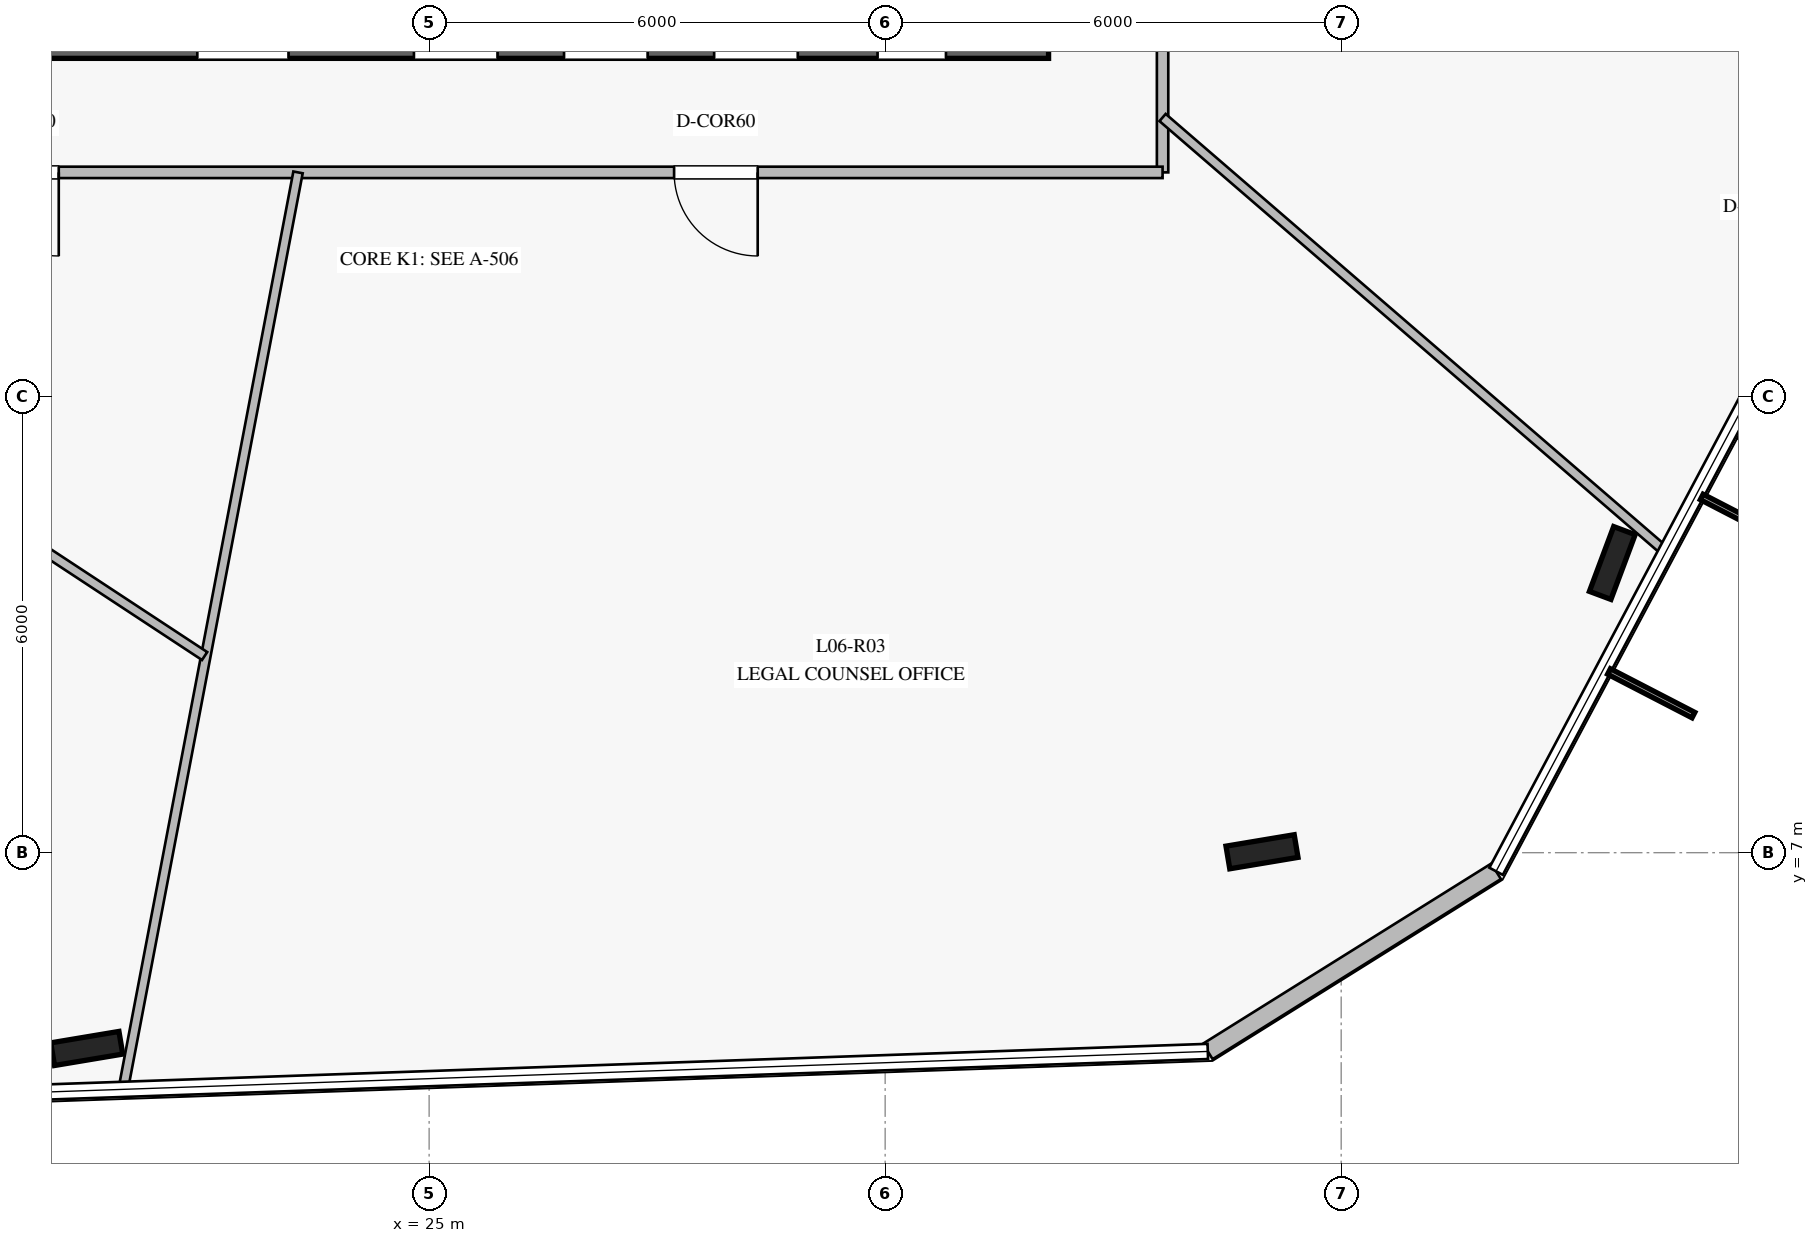
"""IFC4 building model, lengths in metres.
Left out: names, types, materials, properties, quantities, classifications, styles, units other than length and angle.
Written with IfcOpenShell. Run it as: python <this file> out.ifc"""

import sys

from ifc_helpers import new_model, si_unit, direction, frame, frame_2d, origin, origin_2d, place, context, subcontext, project, spatial, rectangle, i_section, extrude, element, fill, save


model = new_model("IFC4")
c1 = context("Model", 3, precision=1e-05, world=origin(), true_north=direction((0.0, 1.0)))
c2 = subcontext(c1, "Body", "Model", "MODEL_VIEW")
j1 = project(units=[si_unit("LENGTHUNIT", "METRE"), si_unit("PLANEANGLEUNIT", "RADIAN")], contexts=[c1])
p1 = place(None, origin())
s1 = spatial("IfcSite", under=j1, at=p1, CompositionType="ELEMENT")
p2 = place(p1, origin())
s2 = spatial("IfcBuilding", under=s1, at=p2, CompositionType="ELEMENT")
p3 = place(p2, frame((0.0, 0.0, 28.0)))
s3 = spatial("IfcBuildingStorey", under=s2, at=p3, CompositionType="ELEMENT", Elevation=28.0)
p4 = place(p3, frame((16.85, 17.8, 0.0), z_axis=(0.0, 0.0, 1.0), x_axis=(1.0, 0.0, 0.0)))
e1 = element("IfcWall", 1, at=p4, inside=s3, PredefinedType="SHEAR", context=c2, shape_type="SweptSolid", body=[
    extrude(rectangle(XDim=16.3, YDim=0.7, at=frame_2d((8.15, 0.0))), origin(), (0.0, 0.0, 1.0), 3.76),
])
p5 = place(p4, frame((5.1, 0.0, 0.0)))
e2 = element("IfcOpeningElement", 2, at=p5, cuts=e1, PredefinedType="OPENING", context=c2, shape_type="SweptSolid", body=[
    extrude(rectangle(XDim=1.2, YDim=2.25, at=frame_2d((0.6, 1.125))), frame((0.0, 0.36, 0.0), z_axis=(0.0, -1.0, 0.0), x_axis=(1.0, 0.0, 0.0)), (0.0, 0.0, 1.0), 0.72),
])
p6 = place(p4, frame((14.05, 0.0, 0.0)))
e3 = element("IfcOpeningElement", 3, at=p6, cuts=e1, PredefinedType="OPENING", context=c2, shape_type="SweptSolid", body=[
    extrude(rectangle(XDim=0.9, YDim=2.1, at=frame_2d((0.45, 1.05))), frame((0.0, 0.36, 0.0), z_axis=(0.0, -1.0, 0.0), x_axis=(1.0, 0.0, 0.0)), (0.0, 0.0, 1.0), 0.72),
])
p7 = place(p4, frame((7.95, 0.0, 0.0)))
e4 = element("IfcOpeningElement", 4, at=p7, cuts=e1, PredefinedType="OPENING", context=c2, shape_type="SweptSolid", body=[
    extrude(rectangle(XDim=1.1, YDim=2.2, at=frame_2d((0.55, 1.1))), frame((0.0, 0.36, 0.0), z_axis=(0.0, -1.0, 0.0), x_axis=(1.0, 0.0, 0.0)), (0.0, 0.0, 1.0), 0.72),
])
p8 = place(p4, frame((9.925, 0.0, 0.0)))
e5 = element("IfcOpeningElement", 5, at=p8, cuts=e1, PredefinedType="OPENING", context=c2, shape_type="SweptSolid", body=[
    extrude(rectangle(XDim=1.1, YDim=2.2, at=frame_2d((0.55, 1.1))), frame((0.0, 0.36, 0.0), z_axis=(0.0, -1.0, 0.0), x_axis=(1.0, 0.0, 0.0)), (0.0, 0.0, 1.0), 0.72),
])
p9 = place(p4, frame((11.9, 0.0, 0.0)))
e6 = element("IfcOpeningElement", 6, at=p9, cuts=e1, PredefinedType="OPENING", context=c2, shape_type="SweptSolid", body=[
    extrude(rectangle(XDim=1.1, YDim=2.2, at=frame_2d((0.55, 1.1))), frame((0.0, 0.36, 0.0), z_axis=(0.0, -1.0, 0.0), x_axis=(1.0, 0.0, 0.0)), (0.0, 0.0, 1.0), 0.72),
])
for number, where, z_axis, x_axis in (
    (7, (32.8, 17.8, 0.0), (0.0, 0.0, 1.0), (1.0, 0.0, 0.0)),
    (8, (20.495, 4.424, 0.0), (0.0, 0.0, 1.0), (0.986, 0.165, 0.0)),
    (9, (35.958, 7.012, 0.0), (0.0, 0.0, 1.0), (0.986, 0.165, 0.0)),
    (10, (40.567, 10.811, 0.0), (0.0, 0.0, 1.0), (0.35, 0.937, 0.0)),
):
    element("IfcColumn", number, at=place(p3, frame(where, z_axis=z_axis, x_axis=x_axis)), inside=s3, PredefinedType="COLUMN", context=c2, shape_type="SweptSolid", body=[
        extrude(i_section(OverallWidth=0.302, OverallDepth=0.91, WebThickness=0.021, FlangeThickness=0.04, at=origin_2d()), origin(), (0.0, 0.0, 1.0), 4.0),
    ])
p10 = place(p3, frame((35.245, 4.385, 0.0), z_axis=(0.0, 0.0, 1.0), x_axis=(0.848071896995, 0.529881173026, 0.0)))
e11 = element("IfcWall", 11, at=p10, inside=s3, PredefinedType="STANDARD", context=c2, shape_type="SweptSolid", body=[
    extrude(rectangle(XDim=4.472, YDim=0.24, at=frame_2d((2.236, 0.0))), origin(), (0.0, 0.0, 1.0), 3.76),
])
p11 = place(p3, frame((34.65, 34.05, 0.0), z_axis=(0.0, 0.0, 1.0), x_axis=(0.0, -1.0, 0.0)))
e12 = element("IfcWall", 12, at=p11, inside=s3, PredefinedType="PARTITIONING", context=c2, shape_type="SweptSolid", body=[
    extrude(rectangle(XDim=18.1, YDim=0.15, at=frame_2d((9.05, 0.0))), origin(), (0.0, 0.0, 1.0), 3.21),
])
p12 = place(p11, frame((13.006, 0.0, 0.0)))
e13 = element("IfcOpeningElement", 13, at=p12, cuts=e12, PredefinedType="OPENING", context=c2, shape_type="SweptSolid", body=[
    extrude(rectangle(XDim=1.1, YDim=2.2, at=frame_2d((0.55, 1.1))), frame((0.0, 0.085, 0.0), z_axis=(0.0, -1.0, 0.0), x_axis=(1.0, 0.0, 0.0)), (0.0, 0.0, 1.0), 0.17),
])
p13 = place(p11, frame((4.626, 0.0, 0.0)))
e14 = element("IfcOpeningElement", 14, at=p13, cuts=e12, PredefinedType="OPENING", context=c2, shape_type="SweptSolid", body=[
    extrude(rectangle(XDim=1.1, YDim=2.2, at=frame_2d((0.55, 1.1))), frame((0.0, 0.085, 0.0), z_axis=(0.0, -1.0, 0.0), x_axis=(1.0, 0.0, 0.0)), (0.0, 0.0, 1.0), 0.17),
])
p14 = place(p3, frame((34.65, 15.95, 0.0), z_axis=(0.0, 0.0, 1.0), x_axis=(-1.0, 0.0, 0.0)))
e15 = element("IfcWall", 15, at=p14, inside=s3, PredefinedType="PARTITIONING", context=c2, shape_type="SweptSolid", body=[
    extrude(rectangle(XDim=19.3, YDim=0.15, at=frame_2d((9.65, 0.0))), origin(), (0.0, 0.0, 1.0), 3.21),
])
p15 = place(p14, frame((14.523, 0.0, 0.0)))
e16 = element("IfcOpeningElement", 16, at=p15, cuts=e15, PredefinedType="OPENING", context=c2, shape_type="SweptSolid", body=[
    extrude(rectangle(XDim=1.1, YDim=2.2, at=frame_2d((0.55, 1.1))), frame((0.0, 0.085, 0.0), z_axis=(0.0, -1.0, 0.0), x_axis=(1.0, 0.0, 0.0)), (0.0, 0.0, 1.0), 0.17),
])
p16 = place(p14, frame((5.327, 0.0, 0.0)))
e17 = element("IfcOpeningElement", 17, at=p16, cuts=e15, PredefinedType="OPENING", context=c2, shape_type="SweptSolid", body=[
    extrude(rectangle(XDim=1.1, YDim=2.2, at=frame_2d((0.55, 1.1))), frame((0.0, 0.085, 0.0), z_axis=(0.0, -1.0, 0.0), x_axis=(1.0, 0.0, 0.0)), (0.0, 0.0, 1.0), 0.17),
])
p17 = place(p3, frame((23.275, 15.95, 0.0), z_axis=(0.0, 0.0, 1.0), x_axis=(-0.187302392837, -0.982302302572, 0.0)))
e18 = element("IfcWall", 18, at=p17, inside=s3, PredefinedType="PARTITIONING", context=c2, shape_type="SweptSolid", body=[
    extrude(rectangle(XDim=12.263, YDim=0.125, at=frame_2d((6.131, 0.0))), origin(), (0.0, 0.0, 1.0), 3.06),
])
p18 = place(p3, frame((34.65, 16.672, 0.0), z_axis=(0.0, 0.0, 1.0), x_axis=(0.757044964205, -0.65336277991, 0.0)))
e19 = element("IfcWall", 19, at=p18, inside=s3, PredefinedType="PARTITIONING", context=c2, shape_type="SweptSolid", body=[
    extrude(rectangle(XDim=8.729, YDim=0.125, at=frame_2d((4.364, 0.0))), origin(), (0.0, 0.0, 1.0), 3.06),
])
p19 = place(p3, frame((7.766, 18.98, 0.0), z_axis=(0.0, 0.0, 1.0), x_axis=(0.83545815699, -0.549554062781, 0.0)))
e20 = element("IfcWall", 20, at=p19, inside=s3, PredefinedType="PARTITIONING", context=c2, shape_type="SweptSolid", body=[
    extrude(rectangle(XDim=17.092, YDim=0.125, at=frame_2d((8.546, 0.0))), origin(), (0.0, 0.0, 1.0), 3.05),
])
p20 = place(p19, frame((8.046, 0.0, 0.0)))
e21 = element("IfcOpeningElement", 21, at=p20, cuts=e20, PredefinedType="OPENING", context=c2, shape_type="SweptSolid", body=[
    extrude(rectangle(XDim=1.0, YDim=2.15, at=frame_2d((0.5, 1.075))), frame((0.0, 0.073, 0.0), z_axis=(0.0, -1.0, 0.0), x_axis=(1.0, 0.0, 0.0)), (0.0, 0.0, 1.0), 0.145),
])
p21 = place(p15, origin())
e22 = element("IfcDoor", 22, at=p21, inside=s3, OperationType="SINGLE_SWING_LEFT", PredefinedType="DOOR", context=c2, shape_type="SweptSolid", body=[
    extrude(rectangle(XDim=1.1, YDim=2.2, at=frame_2d((0.55, 1.1))), frame((0.0, 0.025, 0.0), z_axis=(0.0, -1.0, 0.0), x_axis=(1.0, 0.0, 0.0)), (0.0, 0.0, 1.0), 0.05),
])
fill(e16, e22)
p22 = place(p16, origin())
e23 = element("IfcDoor", 23, at=p22, inside=s3, OperationType="SINGLE_SWING_LEFT", PredefinedType="DOOR", context=c2, shape_type="SweptSolid", body=[
    extrude(rectangle(XDim=1.1, YDim=2.2, at=frame_2d((0.55, 1.1))), frame((0.0, 0.025, 0.0), z_axis=(0.0, -1.0, 0.0), x_axis=(1.0, 0.0, 0.0)), (0.0, 0.0, 1.0), 0.05),
])
fill(e17, e23)
save(model, sys.argv[1])
